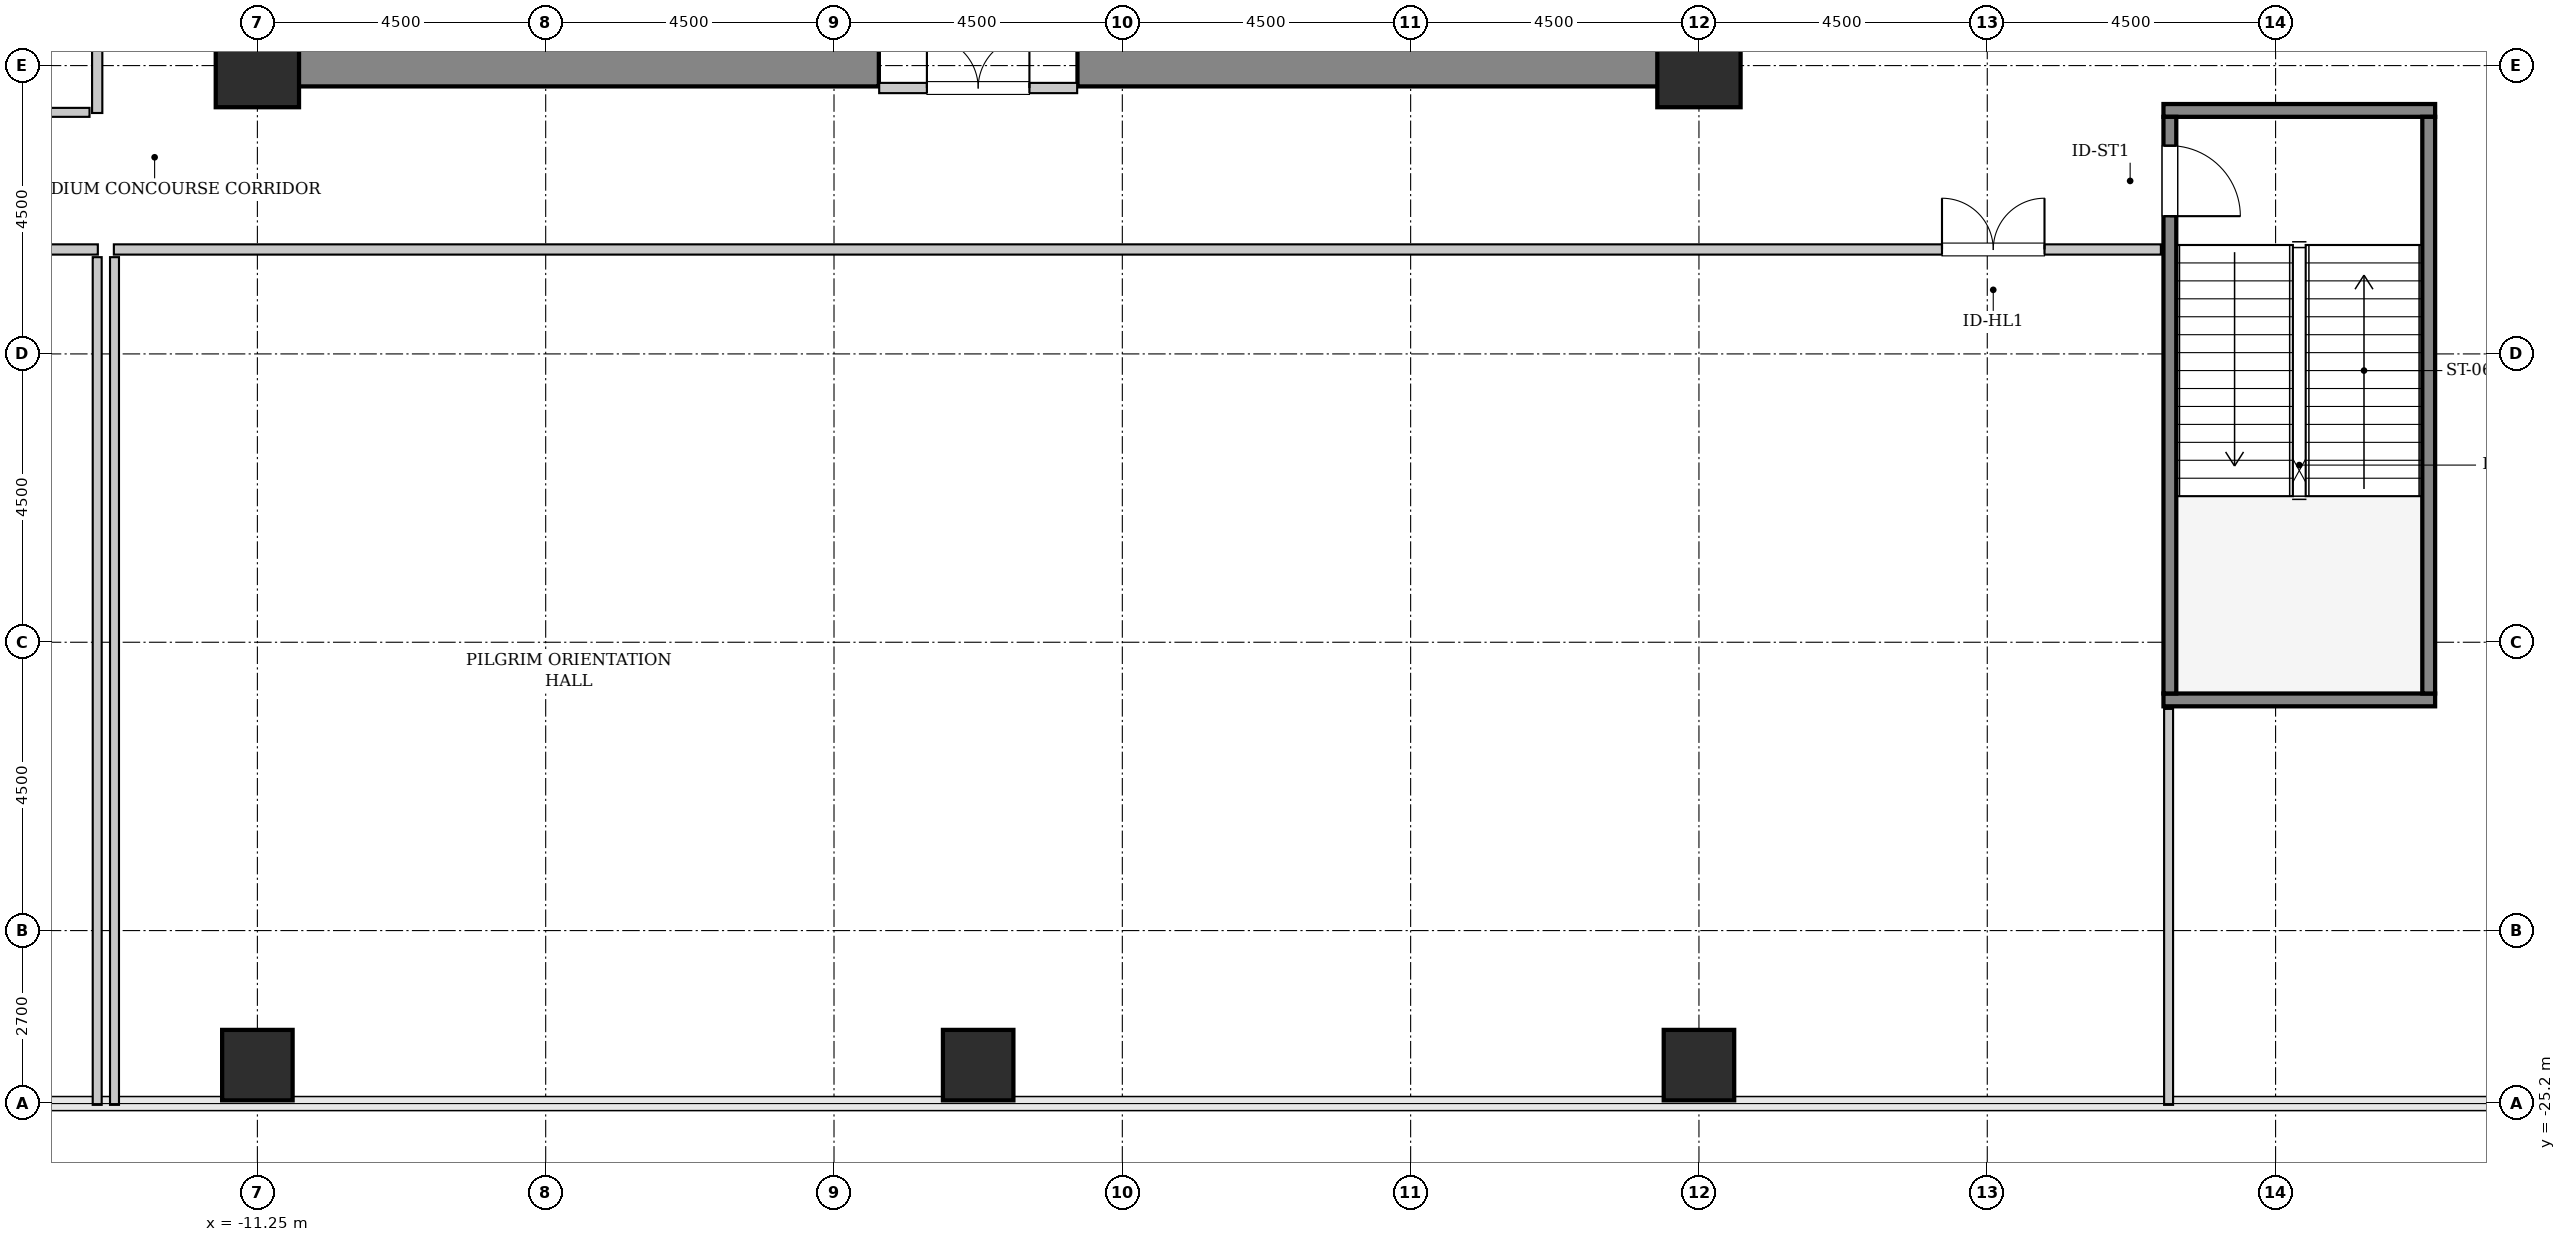
"""IFC4 building model, lengths in metres.
Left out: names, types, materials, properties, quantities, classifications, styles, units other than length and angle.
Written with IfcOpenShell. Run it as: python <this file> out.ifc"""

import sys

from ifc_helpers import new_model, si_unit, direction, frame, frame_2d, origin, origin_2d, place, context, subcontext, project, spatial, rectangle, hollow_rectangle, extrude, source, transform, mapped, element, fill, save


model = new_model("IFC4")
c1 = context("Model", 3, precision=1e-05, world=origin(), true_north=direction((0.0, 1.0)))
c2 = subcontext(c1, "Body", "Model", "MODEL_VIEW")
j1 = project(units=[si_unit("LENGTHUNIT", "METRE"), si_unit("PLANEANGLEUNIT", "RADIAN")], contexts=[c1])
p1 = place(None, origin())
s1 = spatial("IfcSite", under=j1, at=p1, CompositionType="ELEMENT")
p2 = place(p1, origin())
s2 = spatial("IfcBuilding", under=s1, at=p2, CompositionType="ELEMENT")
p3 = place(p2, frame((0.0, 0.0, 11.4)))
s3 = spatial("IfcBuildingStorey", under=s2, at=p3, CompositionType="ELEMENT", Elevation=11.4)
m1 = source(origin(), c2, "Body", "SweptSolid", [
    extrude(rectangle(XDim=10.025, YDim=0.65, at=frame_2d((5.012, 0.0))), origin(), (0.0, 0.0, 1.0), 5.4),
])
for number, where, z_axis, x_axis in (
    (1, (-11.575, -9.0, 0.0), (0.0, 0.0, 1.0), (1.0, 0.0, 0.0)),
    (2, (1.55, -9.0, 0.0), (0.0, 0.0, 1.0), (1.0, 0.0, 0.0)),
):
    element("IfcWall", number, at=place(p3, frame(where, z_axis=z_axis, x_axis=x_axis)), inside=s3, PredefinedType="SHEAR", context=c2, shape_type="MappedRepresentation", body=[
        mapped(m1, transform((0.0, 0.0, 0.0), x_axis=(1.0, 0.0, 0.0), y_axis=(0.0, 1.0, 0.0), z_axis=(0.0, 0.0, 1.0), scale=1.0)),
    ])
m2 = source(origin(), c2, "Body", "SweptSolid", [
    extrude(hollow_rectangle(XDim=1.1, YDim=1.1, WallThickness=0.055, InnerFilletRadius=0.055, OuterFilletRadius=0.11, at=origin_2d()), origin(), (0.0, 0.0, 1.0), 5.4),
])
p4 = place(p3, frame((-11.25, -24.6, 0.0), z_axis=(0.0, 0.0, 1.0), x_axis=(1.0, 0.0, 0.0)))
e3 = element("IfcColumn", 3, at=p4, inside=s3, PredefinedType="COLUMN", context=c2, shape_type="MappedRepresentation", body=[
    mapped(m2, transform((0.0, 0.0, 0.0), x_axis=(1.0, 0.0, 0.0), y_axis=(0.0, 1.0, 0.0), z_axis=(0.0, 0.0, 1.0), scale=1.0)),
])
m3 = source(origin(), c2, "Body", "SweptSolid", [
    extrude(hollow_rectangle(XDim=1.3, YDim=1.3, WallThickness=0.065, InnerFilletRadius=0.065, OuterFilletRadius=0.13, at=origin_2d()), origin(), (0.0, 0.0, 1.0), 5.4),
])
p5 = place(p3, frame((-11.25, -9.0, 0.0), z_axis=(0.0, 0.0, 1.0), x_axis=(1.0, 0.0, 0.0)))
e4 = element("IfcColumn", 4, at=p5, inside=s3, PredefinedType="COLUMN", context=c2, shape_type="MappedRepresentation", body=[
    mapped(m3, transform((0.0, 0.0, 0.0), x_axis=(1.0, 0.0, 0.0), y_axis=(0.0, 1.0, 0.0), z_axis=(0.0, 0.0, 1.0), scale=1.0)),
])
for number, where, z_axis, x_axis in (
    (5, (0.0, -24.6, 0.0), (0.0, 0.0, 1.0), (1.0, 0.0, 0.0)),
    (6, (11.25, -24.6, 0.0), (0.0, 0.0, 1.0), (1.0, 0.0, 0.0)),
):
    element("IfcColumn", number, at=place(p3, frame(where, z_axis=z_axis, x_axis=x_axis)), inside=s3, PredefinedType="COLUMN", context=c2, shape_type="MappedRepresentation", body=[
        mapped(m2, transform((0.0, 0.0, 0.0), x_axis=(1.0, 0.0, 0.0), y_axis=(0.0, 1.0, 0.0), z_axis=(0.0, 0.0, 1.0), scale=1.0)),
    ])
p6 = place(p3, frame((11.25, -9.0, 0.0), z_axis=(0.0, 0.0, 1.0), x_axis=(1.0, 0.0, 0.0)))
e7 = element("IfcColumn", 7, at=p6, inside=s3, PredefinedType="COLUMN", context=c2, shape_type="MappedRepresentation", body=[
    mapped(m3, transform((0.0, 0.0, 0.0), x_axis=(1.0, 0.0, 0.0), y_axis=(0.0, 1.0, 0.0), z_axis=(0.0, 0.0, 1.0), scale=1.0)),
])
m4 = source(origin(), c2, "Body", "SweptSolid", [
    extrude(rectangle(XDim=4.24, YDim=0.2, at=frame_2d((2.12, 0.0))), origin(), (0.0, 0.0, 1.0), 5.4),
])
for number, where, z_axis, x_axis in (
    (8, (18.5, -9.7, 0.0), (0.0, 0.0, 1.0), (1.0, 0.0, 0.0)),
    (9, (18.5, -18.9, 0.0), (0.0, 0.0, 1.0), (1.0, 0.0, 0.0)),
):
    element("IfcWall", number, at=place(p3, frame(where, z_axis=z_axis, x_axis=x_axis)), inside=s3, PredefinedType="SOLIDWALL", context=c2, shape_type="MappedRepresentation", body=[
        mapped(m4, transform((0.0, 0.0, 0.0), x_axis=(1.0, 0.0, 0.0), y_axis=(0.0, 1.0, 0.0), z_axis=(0.0, 0.0, 1.0), scale=1.0)),
    ])
m5 = source(origin(), c2, "Body", "SweptSolid", [
    extrude(rectangle(XDim=9.0, YDim=0.2, at=frame_2d((4.5, 0.0))), origin(), (0.0, 0.0, 1.0), 5.4),
])
p7 = place(p3, frame((18.6, -9.8, 0.0), z_axis=(0.0, 0.0, 1.0), x_axis=(0.0, -1.0, 0.0)))
e10 = element("IfcWall", 10, at=p7, inside=s3, PredefinedType="SOLIDWALL", context=c2, shape_type="MappedRepresentation", body=[
    mapped(m5, transform((0.0, 0.0, 0.0), x_axis=(1.0, 0.0, 0.0), y_axis=(0.0, 1.0, 0.0), z_axis=(0.0, 0.0, 1.0), scale=1.0)),
])
p8 = place(p7, frame((0.45, 0.0, 0.0)))
e11 = element("IfcOpeningElement", 11, at=p8, cuts=e10, PredefinedType="OPENING", context=c2, shape_type="SweptSolid", body=[
    extrude(rectangle(XDim=1.1, YDim=2.15, at=frame_2d((0.55, 1.075))), frame((0.0, 0.11, 0.0), z_axis=(0.0, -1.0, 0.0), x_axis=(1.0, 0.0, 0.0)), (0.0, 0.0, 1.0), 0.22),
])
p9 = place(p3, frame((22.64, -9.8, 0.0), z_axis=(0.0, 0.0, 1.0), x_axis=(0.0, -1.0, 0.0)))
e12 = element("IfcWall", 12, at=p9, inside=s3, PredefinedType="SOLIDWALL", context=c2, shape_type="MappedRepresentation", body=[
    mapped(m5, transform((0.0, 0.0, 0.0), x_axis=(1.0, 0.0, 0.0), y_axis=(0.0, 1.0, 0.0), z_axis=(0.0, 0.0, 1.0), scale=1.0)),
])
m6 = source(origin(), c2, "Body", "SweptSolid", [
    extrude(rectangle(XDim=3.09, YDim=0.16, at=frame_2d((1.545, 0.0))), origin(), (0.0, 0.0, 1.0), 3.975),
])
p10 = place(p3, frame((-1.545, -9.35, 0.0), z_axis=(0.0, 0.0, 1.0), x_axis=(1.0, 0.0, 0.0)))
e13 = element("IfcWall", 13, at=p10, inside=s3, PredefinedType="PARTITIONING", context=c2, shape_type="MappedRepresentation", body=[
    mapped(m6, transform((0.0, 0.0, 0.0), x_axis=(1.0, 0.0, 0.0), y_axis=(0.0, 1.0, 0.0), z_axis=(0.0, 0.0, 1.0), scale=1.0)),
])
p11 = place(p10, frame((0.745, 0.0, 0.0)))
e14 = element("IfcOpeningElement", 14, at=p11, cuts=e13, PredefinedType="OPENING", context=c2, shape_type="SweptSolid", body=[
    extrude(rectangle(XDim=1.6, YDim=2.3, at=frame_2d((0.8, 1.15))), frame((0.0, 0.09, 0.0), z_axis=(0.0, -1.0, 0.0), x_axis=(1.0, 0.0, 0.0)), (0.0, 0.0, 1.0), 0.18),
])
m7 = source(origin(), c2, "Body", "SweptSolid", [
    extrude(rectangle(XDim=19.48, YDim=0.16, at=frame_2d((9.74, 0.0))), origin(), (0.0, 0.0, 1.0), 5.085),
])
p12 = place(p3, frame((-13.75, -9.74, 0.0), z_axis=(0.0, 0.0, 1.0), x_axis=(0.0, 1.0, 0.0)))
e15 = element("IfcWall", 15, at=p12, inside=s3, PredefinedType="PARTITIONING", context=c2, shape_type="MappedRepresentation", body=[
    mapped(m7, transform((0.0, 0.0, 0.0), x_axis=(1.0, 0.0, 0.0), y_axis=(0.0, 1.0, 0.0), z_axis=(0.0, 0.0, 1.0), scale=1.0)),
])
p13 = place(p12, frame((8.94, 0.0, 0.0)))
e16 = element("IfcOpeningElement", 16, at=p13, cuts=e15, PredefinedType="OPENING", context=c2, shape_type="SweptSolid", body=[
    extrude(rectangle(XDim=1.6, YDim=2.3, at=frame_2d((0.8, 1.15))), frame((0.0, 0.09, 0.0), z_axis=(0.0, -1.0, 0.0), x_axis=(1.0, 0.0, 0.0)), (0.0, 0.0, 1.0), 0.18),
])
m8 = source(origin(), c2, "Body", "SweptSolid", [
    extrude(rectangle(XDim=13.625, YDim=0.14, at=frame_2d((6.812, 0.0))), origin(), (0.0, 0.0, 1.0), 5.085),
])
p14 = place(p3, frame((-27.495, -9.73, 0.0), z_axis=(0.0, 0.0, 1.0), x_axis=(1.0, 0.0, 0.0)))
e17 = element("IfcWall", 17, at=p14, inside=s3, PredefinedType="PARTITIONING", context=c2, shape_type="MappedRepresentation", body=[
    mapped(m8, transform((0.0, 0.0, 0.0), x_axis=(1.0, 0.0, 0.0), y_axis=(0.0, 1.0, 0.0), z_axis=(0.0, 0.0, 1.0), scale=1.0)),
])
m9 = source(origin(), c2, "Body", "SweptSolid", [
    extrude(rectangle(XDim=13.72, YDim=0.16, at=frame_2d((6.86, 0.0))), origin(), (0.0, 0.0, 1.0), 5.085),
])
p15 = place(p3, frame((-27.46, -11.87, 0.0), z_axis=(0.0, 0.0, 1.0), x_axis=(1.0, 0.0, 0.0)))
e18 = element("IfcWall", 18, at=p15, inside=s3, PredefinedType="PARTITIONING", context=c2, shape_type="MappedRepresentation", body=[
    mapped(m9, transform((0.0, 0.0, 0.0), x_axis=(1.0, 0.0, 0.0), y_axis=(0.0, 1.0, 0.0), z_axis=(0.0, 0.0, 1.0), scale=1.0)),
])
p16 = place(p15, frame((6.06, 0.0, 0.0)))
e19 = element("IfcOpeningElement", 19, at=p16, cuts=e18, PredefinedType="OPENING", context=c2, shape_type="SweptSolid", body=[
    extrude(rectangle(XDim=1.6, YDim=2.3, at=frame_2d((0.8, 1.15))), frame((0.0, 0.09, 0.0), z_axis=(0.0, -1.0, 0.0), x_axis=(1.0, 0.0, 0.0)), (0.0, 0.0, 1.0), 0.18),
])
m10 = source(origin(), c2, "Body", "SweptSolid", [
    extrude(rectangle(XDim=13.23, YDim=0.14, at=frame_2d((6.615, 0.0))), origin(), (0.0, 0.0, 1.0), 5.085),
])
p17 = place(p3, frame((-13.75, -25.22, 0.0), z_axis=(0.0, 0.0, 1.0), x_axis=(0.0, 1.0, 0.0)))
e20 = element("IfcWall", 20, at=p17, inside=s3, PredefinedType="PARTITIONING", context=c2, shape_type="MappedRepresentation", body=[
    mapped(m10, transform((0.0, 0.0, 0.0), x_axis=(1.0, 0.0, 0.0), y_axis=(0.0, 1.0, 0.0), z_axis=(0.0, 0.0, 1.0), scale=1.0)),
])
m11 = source(origin(), c2, "Body", "SweptSolid", [
    extrude(rectangle(XDim=31.95, YDim=0.16, at=frame_2d((15.975, 0.0))), origin(), (0.0, 0.0, 1.0), 5.085),
])
p18 = place(p3, frame((-13.49, -11.87, 0.0), z_axis=(0.0, 0.0, 1.0), x_axis=(1.0, 0.0, 0.0)))
e21 = element("IfcWall", 21, at=p18, inside=s3, PredefinedType="PARTITIONING", context=c2, shape_type="MappedRepresentation", body=[
    mapped(m11, transform((0.0, 0.0, 0.0), x_axis=(1.0, 0.0, 0.0), y_axis=(0.0, 1.0, 0.0), z_axis=(0.0, 0.0, 1.0), scale=1.0)),
])
p19 = place(p18, frame((28.533, 0.0, 0.0)))
e22 = element("IfcOpeningElement", 22, at=p19, cuts=e21, PredefinedType="OPENING", context=c2, shape_type="SweptSolid", body=[
    extrude(rectangle(XDim=1.6, YDim=2.3, at=frame_2d((0.8, 1.15))), frame((0.0, 0.09, 0.0), z_axis=(0.0, -1.0, 0.0), x_axis=(1.0, 0.0, 0.0)), (0.0, 0.0, 1.0), 0.18),
])
m12 = source(origin(), c2, "Body", "SweptSolid", [
    extrude(rectangle(XDim=6.18, YDim=0.14, at=frame_2d((3.09, 0.0))), origin(), (0.0, 0.0, 1.0), 5.085),
])
p20 = place(p3, frame((18.58, -25.22, 0.0), z_axis=(0.0, 0.0, 1.0), x_axis=(0.0, 1.0, 0.0)))
e23 = element("IfcWall", 23, at=p20, inside=s3, PredefinedType="PARTITIONING", context=c2, shape_type="MappedRepresentation", body=[
    mapped(m12, transform((0.0, 0.0, 0.0), x_axis=(1.0, 0.0, 0.0), y_axis=(0.0, 1.0, 0.0), z_axis=(0.0, 0.0, 1.0), scale=1.0)),
])
p21 = place(p3, frame((-13.48, -25.22, 0.0), z_axis=(0.0, 0.0, 1.0), x_axis=(0.0, 1.0, 0.0)))
e24 = element("IfcWall", 24, at=p21, inside=s3, PredefinedType="PARTITIONING", context=c2, shape_type="MappedRepresentation", body=[
    mapped(m10, transform((0.0, 0.0, 0.0), x_axis=(1.0, 0.0, 0.0), y_axis=(0.0, 1.0, 0.0), z_axis=(0.0, 0.0, 1.0), scale=1.0)),
])
m13 = source(origin(), c2, "Body", "SweptSolid", [
    extrude(rectangle(XDim=1.1, YDim=2.15, at=frame_2d((0.55, 1.075))), frame((0.0, 0.025, 0.0), z_axis=(0.0, -1.0, 0.0), x_axis=(1.0, 0.0, 0.0)), (0.0, 0.0, 1.0), 0.05),
])
p22 = place(p8, origin())
e25 = element("IfcDoor", 25, at=p22, inside=s3, OperationType="SINGLE_SWING_RIGHT", PredefinedType="DOOR", context=c2, shape_type="MappedRepresentation", body=[
    mapped(m13, transform((0.0, 0.0, 0.0), x_axis=(1.0, 0.0, 0.0), y_axis=(0.0, 1.0, 0.0), z_axis=(0.0, 0.0, 1.0), scale=1.0)),
])
fill(e11, e25)
m14 = source(origin(), c2, "Body", "SweptSolid", [
    extrude(rectangle(XDim=1.6, YDim=2.3, at=frame_2d((0.8, 1.15))), frame((0.0, 0.025, 0.0), z_axis=(0.0, -1.0, 0.0), x_axis=(1.0, 0.0, 0.0)), (0.0, 0.0, 1.0), 0.05),
])
p23 = place(p11, origin())
e26 = element("IfcDoor", 26, at=p23, inside=s3, OperationType="DOUBLE_DOOR_SINGLE_SWING", PredefinedType="DOOR", context=c2, shape_type="MappedRepresentation", body=[
    mapped(m14, transform((0.0, 0.0, 0.0), x_axis=(1.0, 0.0, 0.0), y_axis=(0.0, 1.0, 0.0), z_axis=(0.0, 0.0, 1.0), scale=1.0)),
])
fill(e14, e26)
p24 = place(p19, origin())
e27 = element("IfcDoor", 27, at=p24, inside=s3, OperationType="DOUBLE_DOOR_SINGLE_SWING", PredefinedType="DOOR", context=c2, shape_type="MappedRepresentation", body=[
    mapped(m14, transform((0.0, 0.0, 0.0), x_axis=(1.0, 0.0, 0.0), y_axis=(0.0, 1.0, 0.0), z_axis=(0.0, 0.0, 1.0), scale=1.0)),
])
fill(e22, e27)
save(model, sys.argv[1])
